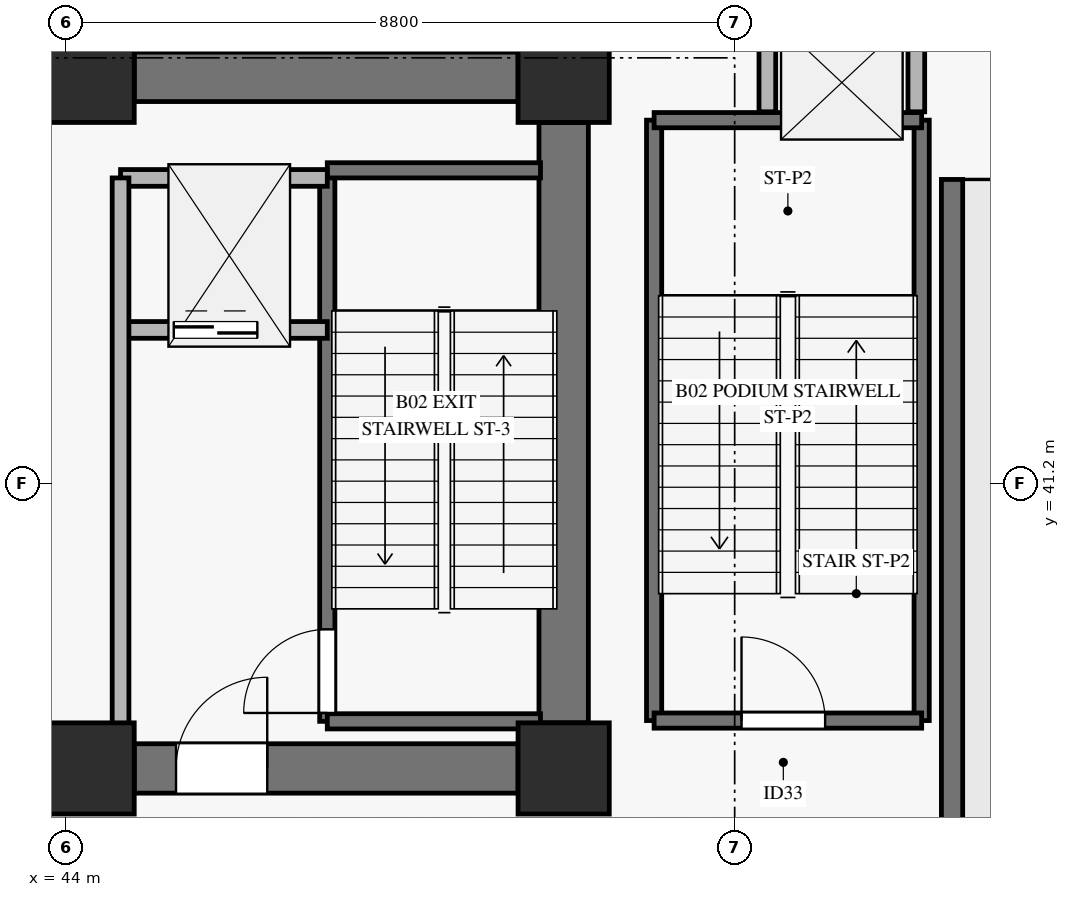
"""IFC4 building model, lengths in metres.
Left out: names, types, materials, properties, quantities, classifications, styles, units other than length and angle.
Written with IfcOpenShell. Run it as: python <this file> out.ifc"""

import sys

from ifc_helpers import new_model, si_unit, direction, frame, frame_2d, origin, origin_2d, place, context, subcontext, project, spatial, rectangle, extrude, source, transform, mapped, element, fill, save


model = new_model("IFC4")
c1 = context("Model", 3, precision=1e-05, world=origin(), true_north=direction((0.0, 1.0)))
c2 = subcontext(c1, "Body", "Model", "MODEL_VIEW")
j1 = project(units=[si_unit("LENGTHUNIT", "METRE"), si_unit("PLANEANGLEUNIT", "RADIAN")], contexts=[c1])
p1 = place(None, origin())
s1 = spatial("IfcSite", under=j1, at=p1, CompositionType="ELEMENT")
p2 = place(p1, origin())
s2 = spatial("IfcBuilding", under=s1, at=p2, CompositionType="ELEMENT")
p3 = place(p2, frame((0.0, 0.0, -10.4)))
s3 = spatial("IfcBuildingStorey", under=s2, at=p3, CompositionType="ELEMENT", Elevation=-10.4)
m1 = source(origin(), c2, "Body", "SweptSolid", [
    extrude(rectangle(XDim=1.2, YDim=1.2, at=origin_2d()), origin(), (0.0, 0.0, 1.0), 4.9),
])
for number, where, z_axis, x_axis in (
    (1, (44.3, 37.45, 0.0), (0.0, 0.0, 1.0), (1.0, 0.0, 0.0)),
    (2, (44.3, 46.55, 0.0), (0.0, 0.0, 1.0), (1.0, 0.0, 0.0)),
    (3, (50.55, 37.45, 0.0), (0.0, 0.0, 1.0), (1.0, 0.0, 0.0)),
    (4, (50.55, 46.55, 0.0), (0.0, 0.0, 1.0), (1.0, 0.0, 0.0)),
):
    element("IfcColumn", number, at=place(p3, frame(where, z_axis=z_axis, x_axis=x_axis)), inside=s3, PredefinedType="PILASTER", context=c2, shape_type="MappedRepresentation", body=[
        mapped(m1, transform((0.0, 0.0, 0.0), x_axis=(1.0, 0.0, 0.0), y_axis=(0.0, 1.0, 0.0), z_axis=(0.0, 0.0, 1.0), scale=1.0)),
    ])
p4 = place(p3, frame((44.9, 46.55, 0.0), z_axis=(0.0, 0.0, 1.0), x_axis=(1.0, 0.0, 0.0)))
e5 = element("IfcWall", 5, at=p4, inside=s3, PredefinedType="SHEAR", context=c2, shape_type="SweptSolid", body=[
    extrude(rectangle(XDim=5.05, YDim=0.65, at=frame_2d((2.525, 0.0))), origin(), (0.0, 0.0, 1.0), 4.9),
])
p5 = place(p3, frame((44.9, 37.45, 0.0), z_axis=(0.0, 0.0, 1.0), x_axis=(1.0, 0.0, 0.0)))
e6 = element("IfcWall", 6, at=p5, inside=s3, PredefinedType="SHEAR", context=c2, shape_type="SweptSolid", body=[
    extrude(rectangle(XDim=5.05, YDim=0.65, at=frame_2d((2.525, 0.0))), origin(), (0.0, 0.0, 1.0), 4.9),
])
p6 = place(p5, frame((0.55, 0.0, 0.0)))
e7 = element("IfcOpeningElement", 7, at=p6, cuts=e6, PredefinedType="OPENING", context=c2, shape_type="SweptSolid", body=[
    extrude(rectangle(XDim=1.2, YDim=2.15, at=frame_2d((0.6, 1.075))), frame((0.0, 0.335, 0.0), z_axis=(0.0, -1.0, 0.0), x_axis=(1.0, 0.0, 0.0)), (0.0, 0.0, 1.0), 0.67),
])
p7 = place(p3, frame((50.55, 38.05, 0.0), z_axis=(0.0, 0.0, 1.0), x_axis=(0.0, 1.0, 0.0)))
e8 = element("IfcWall", 8, at=p7, inside=s3, PredefinedType="SHEAR", context=c2, shape_type="SweptSolid", body=[
    extrude(rectangle(XDim=7.9, YDim=0.65, at=frame_2d((3.95, 0.0))), origin(), (0.0, 0.0, 1.0), 4.9),
])
p8 = place(p3, frame((55.66, 3.46, 0.0), z_axis=(0.0, 0.0, 1.0), x_axis=(0.0, 1.0, 0.0)))
e9 = element("IfcWall", 9, at=p8, inside=s3, PredefinedType="SOLIDWALL", context=c2, shape_type="SweptSolid", body=[
    extrude(rectangle(XDim=41.74, YDim=0.28, at=frame_2d((20.87, 0.0))), origin(), (0.0, 0.0, 1.0), 5.2),
])
p9 = place(p3, frame((47.44, 38.07, 0.0), z_axis=(0.0, 0.0, 1.0), x_axis=(0.0, 1.0, 0.0)))
e10 = element("IfcWall", 10, at=p9, inside=s3, PredefinedType="SOLIDWALL", context=c2, shape_type="SweptSolid", body=[
    extrude(rectangle(XDim=7.25, YDim=0.2, at=frame_2d((3.625, 0.0))), origin(), (0.0, 0.0, 1.0), 5.2),
])
p10 = place(p9, frame((0.11, 0.0, 0.0)))
e11 = element("IfcOpeningElement", 11, at=p10, cuts=e10, PredefinedType="OPENING", context=c2, shape_type="SweptSolid", body=[
    extrude(rectangle(XDim=1.1, YDim=2.15, at=frame_2d((0.55, 1.075))), frame((0.0, 0.11, 0.0), z_axis=(0.0, -1.0, 0.0), x_axis=(1.0, 0.0, 0.0)), (0.0, 0.0, 1.0), 0.22),
])
for number, where, z_axis, x_axis in (
    (12, (47.44, 45.32, 0.0), (0.0, 0.0, 1.0), (1.0, 0.0, 0.0)),
    (13, (47.44, 38.07, 0.0), (0.0, 0.0, 1.0), (1.0, 0.0, 0.0)),
):
    element("IfcWall", number, at=place(p3, frame(where, z_axis=z_axis, x_axis=x_axis)), inside=s3, PredefinedType="SOLIDWALL", context=c2, shape_type="SweptSolid", body=[
        extrude(rectangle(XDim=2.805, YDim=0.2, at=frame_2d((1.403, 0.0))), origin(), (0.0, 0.0, 1.0), 5.2),
    ])
p11 = place(p3, frame((44.72, 43.22, 0.0), z_axis=(0.0, 0.0, 1.0), x_axis=(1.0, 0.0, 0.0)))
e14 = element("IfcWall", 14, at=p11, inside=s3, PredefinedType="SOLIDWALL", context=c2, shape_type="SweptSolid", body=[
    extrude(rectangle(XDim=2.72, YDim=0.22, at=frame_2d((1.36, 0.0))), origin(), (0.0, 0.0, 1.0), 4.9),
])
p12 = place(p11, frame((0.7, 0.0, 0.0)))
e15 = element("IfcOpeningElement", 15, at=p12, cuts=e14, PredefinedType="OPENING", context=c2, shape_type="SweptSolid", body=[
    extrude(rectangle(XDim=1.1, YDim=2.2, at=frame_2d((0.55, 1.1))), frame((0.0, 0.12, 0.0), z_axis=(0.0, -1.0, 0.0), x_axis=(1.0, 0.0, 0.0)), (0.0, 0.0, 1.0), 0.24),
])
p13 = place(p3, frame((44.72, 45.22, 0.0), z_axis=(0.0, 0.0, 1.0), x_axis=(1.0, 0.0, 0.0)))
e16 = element("IfcWall", 16, at=p13, inside=s3, PredefinedType="SOLIDWALL", context=c2, shape_type="SweptSolid", body=[
    extrude(rectangle(XDim=2.72, YDim=0.22, at=frame_2d((1.36, 0.0))), origin(), (0.0, 0.0, 1.0), 4.9),
])
p14 = place(p3, frame((44.72, 37.755, 0.0), z_axis=(0.0, 0.0, 1.0), x_axis=(0.0, 1.0, 0.0)))
e17 = element("IfcWall", 17, at=p14, inside=s3, PredefinedType="SOLIDWALL", context=c2, shape_type="SweptSolid", body=[
    extrude(rectangle(XDim=7.465, YDim=0.22, at=frame_2d((3.732, 0.0))), origin(), (0.0, 0.0, 1.0), 4.9),
])
for number, where, z_axis, x_axis in (
    (18, (51.74, 38.08, 0.0), (0.0, 0.0, 1.0), (0.0, 1.0, 0.0)),
    (19, (55.26, 38.08, 0.0), (0.0, 0.0, 1.0), (0.0, 1.0, 0.0)),
):
    element("IfcWall", number, at=place(p3, frame(where, z_axis=z_axis, x_axis=x_axis)), inside=s3, PredefinedType="SOLIDWALL", context=c2, shape_type="SweptSolid", body=[
        extrude(rectangle(XDim=7.9, YDim=0.2, at=frame_2d((3.95, 0.0))), origin(), (0.0, 0.0, 1.0), 5.2),
    ])
p15 = place(p3, frame((51.74, 45.98, 0.0), z_axis=(0.0, 0.0, 1.0), x_axis=(1.0, 0.0, 0.0)))
e20 = element("IfcWall", 20, at=p15, inside=s3, PredefinedType="SOLIDWALL", context=c2, shape_type="SweptSolid", body=[
    extrude(rectangle(XDim=3.52, YDim=0.2, at=frame_2d((1.76, 0.0))), origin(), (0.0, 0.0, 1.0), 5.2),
])
p16 = place(p3, frame((51.74, 38.08, 0.0), z_axis=(0.0, 0.0, 1.0), x_axis=(1.0, 0.0, 0.0)))
e21 = element("IfcWall", 21, at=p16, inside=s3, PredefinedType="SOLIDWALL", context=c2, shape_type="SweptSolid", body=[
    extrude(rectangle(XDim=3.52, YDim=0.2, at=frame_2d((1.76, 0.0))), origin(), (0.0, 0.0, 1.0), 5.2),
])
p17 = place(p16, frame((1.15, 0.0, 0.0)))
e22 = element("IfcOpeningElement", 22, at=p17, cuts=e21, PredefinedType="OPENING", context=c2, shape_type="SweptSolid", body=[
    extrude(rectangle(XDim=1.1, YDim=2.15, at=frame_2d((0.55, 1.075))), frame((0.0, 0.11, 0.0), z_axis=(0.0, -1.0, 0.0), x_axis=(1.0, 0.0, 0.0)), (0.0, 0.0, 1.0), 0.22),
])
for number, where, z_axis, x_axis in (
    (23, (53.23, 46.09, 0.0), (0.0, 0.0, 1.0), (0.0, 1.0, 0.0)),
    (24, (55.19, 46.09, 0.0), (0.0, 0.0, 1.0), (0.0, 1.0, 0.0)),
):
    element("IfcWall", number, at=place(p3, frame(where, z_axis=z_axis, x_axis=x_axis)), inside=s3, PredefinedType="SOLIDWALL", context=c2, shape_type="SweptSolid", body=[
        extrude(rectangle(XDim=1.29, YDim=0.22, at=frame_2d((0.645, 0.0))), origin(), (0.0, 0.0, 1.0), 4.9),
    ])
m2 = source(origin(), c2, "Body", "SweptSolid", [
    extrude(rectangle(XDim=1.1, YDim=2.15, at=frame_2d((0.55, 1.075))), frame((0.0, 0.025, 0.0), z_axis=(0.0, -1.0, 0.0), x_axis=(1.0, 0.0, 0.0)), (0.0, 0.0, 1.0), 0.05),
])
p18 = place(p10, origin())
e25 = element("IfcDoor", 25, at=p18, inside=s3, OperationType="SINGLE_SWING_LEFT", PredefinedType="DOOR", context=c2, shape_type="MappedRepresentation", body=[
    mapped(m2, transform((0.0, 0.0, 0.0), x_axis=(1.0, 0.0, 0.0), y_axis=(0.0, 1.0, 0.0), z_axis=(0.0, 0.0, 1.0), scale=1.0)),
])
fill(e11, e25)
m3 = source(origin(), c2, "Body", "SweptSolid", [
    extrude(rectangle(XDim=1.1, YDim=2.2, at=frame_2d((0.55, 1.1))), frame((0.0, 0.025, 0.0), z_axis=(0.0, -1.0, 0.0), x_axis=(1.0, 0.0, 0.0)), (0.0, 0.0, 1.0), 0.05),
])
p19 = place(p12, origin())
e26 = element("IfcDoor", 26, at=p19, inside=s3, OperationType="SLIDING_TO_LEFT", PredefinedType="DOOR", context=c2, shape_type="MappedRepresentation", body=[
    mapped(m3, transform((0.0, 0.0, 0.0), x_axis=(1.0, 0.0, 0.0), y_axis=(0.0, 1.0, 0.0), z_axis=(0.0, 0.0, 1.0), scale=1.0)),
])
fill(e15, e26)
m4 = source(origin(), c2, "Body", "SweptSolid", [
    extrude(rectangle(XDim=1.2, YDim=2.15, at=frame_2d((0.6, 1.075))), frame((0.0, 0.025, 0.0), z_axis=(0.0, -1.0, 0.0), x_axis=(1.0, 0.0, 0.0)), (0.0, 0.0, 1.0), 0.05),
])
p20 = place(p6, origin())
e27 = element("IfcDoor", 27, at=p20, inside=s3, OperationType="SINGLE_SWING_RIGHT", PredefinedType="DOOR", context=c2, shape_type="MappedRepresentation", body=[
    mapped(m4, transform((0.0, 0.0, 0.0), x_axis=(1.0, 0.0, 0.0), y_axis=(0.0, 1.0, 0.0), z_axis=(0.0, 0.0, 1.0), scale=1.0)),
])
fill(e7, e27)
p21 = place(p17, origin())
e28 = element("IfcDoor", 28, at=p21, inside=s3, OperationType="SINGLE_SWING_LEFT", PredefinedType="DOOR", context=c2, shape_type="MappedRepresentation", body=[
    mapped(m2, transform((0.0, 0.0, 0.0), x_axis=(1.0, 0.0, 0.0), y_axis=(0.0, 1.0, 0.0), z_axis=(0.0, 0.0, 1.0), scale=1.0)),
])
fill(e22, e28)
save(model, sys.argv[1])
